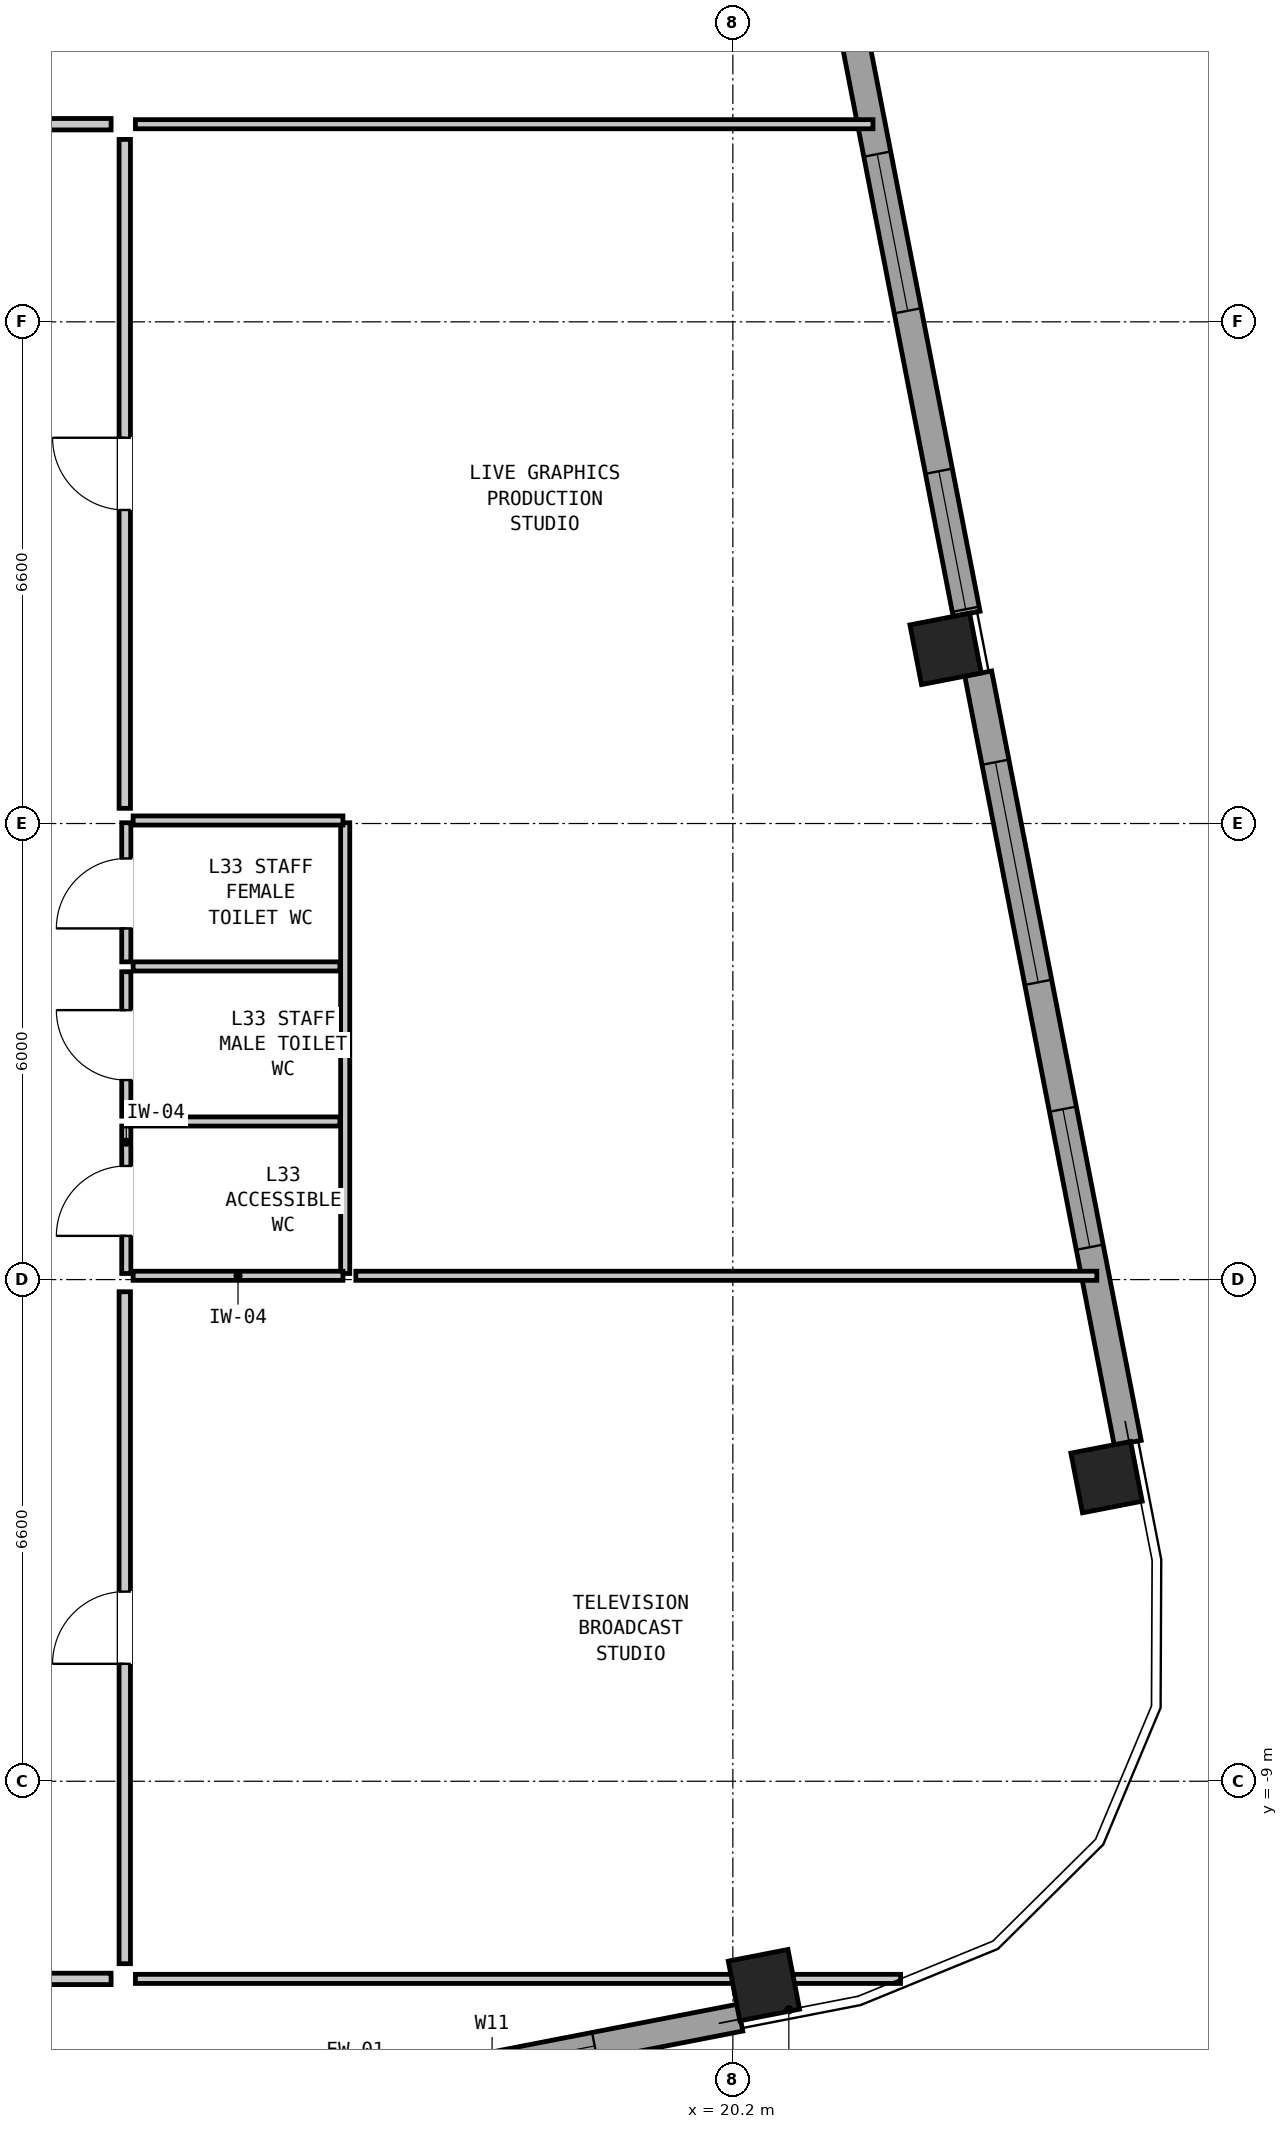
"""IFC4 building model, lengths in metres.
Left out: names, types, materials, properties, quantities, classifications, styles, units other than length and angle.
Written with IfcOpenShell. Run it as: python <this file> out.ifc"""

import sys

from ifc_helpers import new_model, si_unit, direction, frame, frame_2d, origin, origin_2d, place, context, subcontext, project, spatial, rectangle, hollow_rectangle, extrude, element, fill, save


model = new_model("IFC4")
c1 = context("Model", 3, precision=1e-05, world=origin(), true_north=direction((0.0, 1.0)))
c2 = subcontext(c1, "Body", "Model", "MODEL_VIEW")
j1 = project(units=[si_unit("LENGTHUNIT", "METRE"), si_unit("PLANEANGLEUNIT", "RADIAN")], contexts=[c1])
p1 = place(None, origin())
s1 = spatial("IfcSite", under=j1, at=p1, CompositionType="ELEMENT")
p2 = place(p1, origin())
s2 = spatial("IfcBuilding", under=s1, at=p2, CompositionType="ELEMENT")
p3 = place(p2, frame((0.0, 0.0, 115.85)))
s3 = spatial("IfcBuildingStorey", under=s2, at=p3, CompositionType="ELEMENT", Elevation=115.85)
for number, where, z_axis, x_axis in (
    (1, (20.609, -11.682, 0.0), (0.0, 0.0, 1.0), (0.982, 0.191, 0.0)),
    (2, (25.116, -5.0, 0.0), (0.0, 0.0, 1.0), (-0.191, 0.982, 0.0)),
    (3, (22.998, 5.896, 0.0), (0.0, 0.0, 1.0), (-0.191, 0.982, 0.0)),
):
    element("IfcColumn", number, at=place(p3, frame(where, z_axis=z_axis, x_axis=x_axis)), inside=s3, PredefinedType="COLUMN", context=c2, shape_type="SweptSolid", body=[
        extrude(hollow_rectangle(XDim=0.8, YDim=0.8, WallThickness=0.05, at=origin_2d()), origin(), (0.0, 0.0, 1.0), 3.05),
    ])
p4 = place(p3, frame((20.296, -12.11, 0.0), z_axis=(0.0, 0.0, 1.0), x_axis=(-0.981628941133, -0.190799952646, 0.0)))
e4 = element("IfcWall", 4, at=p4, inside=s3, PredefinedType="SOLIDWALL", context=c2, shape_type="SweptSolid", body=[
    extrude(rectangle(XDim=10.312, YDim=0.36, at=frame_2d((5.156, 0.0))), origin(), (0.0, 0.0, 1.0), 2.067),
])
p5 = place(p4, frame((1.95, 0.0, 0.2)))
e5 = element("IfcOpeningElement", 5, at=p5, cuts=e4, PredefinedType="OPENING", context=c2, shape_type="SweptSolid", body=[
    extrude(rectangle(XDim=2.75, YDim=0.95, at=frame_2d((1.375, 0.475))), frame((0.0, 0.192, 0.0), z_axis=(0.0, -1.0, 0.0), x_axis=(1.0, 0.0, 0.0)), (0.0, 0.0, 1.0), 0.384),
])
p6 = place(p4, frame((6.25, 0.0, 0.95)))
e6 = element("IfcOpeningElement", 6, at=p6, cuts=e4, PredefinedType="OPENING", context=c2, shape_type="SweptSolid", body=[
    extrude(rectangle(XDim=2.75, YDim=0.95, at=frame_2d((1.375, 0.475))), frame((0.0, 0.192, 0.0), z_axis=(0.0, -1.0, 0.0), x_axis=(1.0, 0.0, 0.0)), (0.0, 0.0, 1.0), 0.384),
])
p7 = place(p3, frame((21.31, 16.469, 0.0), z_axis=(0.0, 0.0, 1.0), x_axis=(0.190811924826, -0.981626614016, 0.0)))
e7 = element("IfcWall", 7, at=p7, inside=s3, PredefinedType="SOLIDWALL", context=c2, shape_type="SweptSolid", body=[
    extrude(rectangle(XDim=10.3, YDim=0.36, at=frame_2d((5.15, 0.0))), origin(), (0.0, 0.0, 1.0), 2.067),
])
p8 = place(p7, frame((0.038, 0.0, 0.2)))
e8 = element("IfcOpeningElement", 8, at=p8, cuts=e7, PredefinedType="OPENING", context=c2, shape_type="SweptSolid", body=[
    extrude(rectangle(XDim=1.8, YDim=1.25, at=frame_2d((0.9, 0.625))), frame((0.0, 0.192, 0.0), z_axis=(0.0, -1.0, 0.0), x_axis=(1.0, 0.0, 0.0)), (0.0, 0.0, 1.0), 0.384),
])
p9 = place(p7, frame((4.138, 0.0, 0.7)))
e9 = element("IfcOpeningElement", 9, at=p9, cuts=e7, PredefinedType="OPENING", context=c2, shape_type="SweptSolid", body=[
    extrude(rectangle(XDim=2.1, YDim=1.2, at=frame_2d((1.05, 0.6))), frame((0.0, 0.192, 0.0), z_axis=(0.0, -1.0, 0.0), x_axis=(1.0, 0.0, 0.0)), (0.0, 0.0, 1.0), 0.384),
])
p10 = place(p7, frame((8.388, 0.0, 0.2)))
e10 = element("IfcOpeningElement", 10, at=p10, cuts=e7, PredefinedType="OPENING", context=c2, shape_type="SweptSolid", body=[
    extrude(rectangle(XDim=1.85, YDim=1.2, at=frame_2d((0.925, 0.6))), frame((0.0, 0.192, 0.0), z_axis=(0.0, -1.0, 0.0), x_axis=(1.0, 0.0, 0.0)), (0.0, 0.0, 1.0), 0.384),
])
p11 = place(p3, frame((23.428, 5.573, 0.0), z_axis=(0.0, 0.0, 1.0), x_axis=(0.190827200853, -0.981623644486, 0.0)))
e11 = element("IfcWall", 11, at=p11, inside=s3, PredefinedType="SOLIDWALL", context=c2, shape_type="SweptSolid", body=[
    extrude(rectangle(XDim=10.312, YDim=0.36, at=frame_2d((5.156, 0.0))), origin(), (0.0, 0.0, 1.0), 2.067),
])
p12 = place(p11, frame((1.188, 0.0, 0.95)))
e12 = element("IfcOpeningElement", 12, at=p12, cuts=e11, PredefinedType="OPENING", context=c2, shape_type="SweptSolid", body=[
    extrude(rectangle(XDim=2.95, YDim=0.95, at=frame_2d((1.475, 0.475))), frame((0.0, 0.192, 0.0), z_axis=(0.0, -1.0, 0.0), x_axis=(1.0, 0.0, 0.0)), (0.0, 0.0, 1.0), 0.384),
])
p13 = place(p11, frame((5.838, 0.0, 0.2)))
e13 = element("IfcOpeningElement", 13, at=p13, cuts=e11, PredefinedType="OPENING", context=c2, shape_type="SweptSolid", body=[
    extrude(rectangle(XDim=1.85, YDim=1.15, at=frame_2d((0.925, 0.575))), frame((0.0, 0.192, 0.0), z_axis=(0.0, -1.0, 0.0), x_axis=(1.0, 0.0, 0.0)), (0.0, 0.0, 1.0), 0.384),
])
p14 = place(p3, frame((12.22, -2.32, 0.0), z_axis=(0.0, 0.0, 1.0), x_axis=(0.0, 1.0, 0.0)))
e14 = element("IfcWall", 14, at=p14, inside=s3, PredefinedType="PARTITIONING", context=c2, shape_type="SweptSolid", body=[
    extrude(rectangle(XDim=1.94, YDim=0.12, at=frame_2d((0.97, 0.0))), origin(), (0.0, 0.0, 1.0), 2.83),
])
p15 = place(p14, frame((0.495, 0.0, 0.0)))
e15 = element("IfcOpeningElement", 15, at=p15, cuts=e14, PredefinedType="OPENING", context=c2, shape_type="SweptSolid", body=[
    extrude(rectangle(XDim=0.92, YDim=2.1, at=frame_2d((0.46, 1.05))), frame((0.0, 0.072, 0.0), z_axis=(0.0, -1.0, 0.0), x_axis=(1.0, 0.0, 0.0)), (0.0, 0.0, 1.0), 0.144),
])
p16 = place(p3, frame((12.22, -0.25, 0.0), z_axis=(0.0, 0.0, 1.0), x_axis=(0.0, 1.0, 0.0)))
e16 = element("IfcWall", 16, at=p16, inside=s3, PredefinedType="PARTITIONING", context=c2, shape_type="SweptSolid", body=[
    extrude(rectangle(XDim=1.9, YDim=0.12, at=frame_2d((0.95, 0.0))), origin(), (0.0, 0.0, 1.0), 2.83),
])
p17 = place(p16, frame((0.475, 0.0, 0.0)))
e17 = element("IfcOpeningElement", 17, at=p17, cuts=e16, PredefinedType="OPENING", context=c2, shape_type="SweptSolid", body=[
    extrude(rectangle(XDim=0.92, YDim=2.1, at=frame_2d((0.46, 1.05))), frame((0.0, 0.072, 0.0), z_axis=(0.0, -1.0, 0.0), x_axis=(1.0, 0.0, 0.0)), (0.0, 0.0, 1.0), 0.144),
])
p18 = place(p3, frame((12.22, 1.78, 0.0), z_axis=(0.0, 0.0, 1.0), x_axis=(0.0, 1.0, 0.0)))
e18 = element("IfcWall", 18, at=p18, inside=s3, PredefinedType="PARTITIONING", context=c2, shape_type="SweptSolid", body=[
    extrude(rectangle(XDim=1.83, YDim=0.12, at=frame_2d((0.915, 0.0))), origin(), (0.0, 0.0, 1.0), 2.83),
])
p19 = place(p18, frame((0.44, 0.0, 0.0)))
e19 = element("IfcOpeningElement", 19, at=p19, cuts=e18, PredefinedType="OPENING", context=c2, shape_type="SweptSolid", body=[
    extrude(rectangle(XDim=0.92, YDim=2.1, at=frame_2d((0.46, 1.05))), frame((0.0, 0.072, 0.0), z_axis=(0.0, -1.0, 0.0), x_axis=(1.0, 0.0, 0.0)), (0.0, 0.0, 1.0), 0.144),
])
p20 = place(p3, frame((15.1, -2.32, 0.0), z_axis=(0.0, 0.0, 1.0), x_axis=(0.0, 1.0, 0.0)))
e20 = element("IfcWall", 20, at=p20, inside=s3, PredefinedType="PARTITIONING", context=c2, shape_type="SweptSolid", body=[
    extrude(rectangle(XDim=5.93, YDim=0.12, at=frame_2d((2.965, 0.0))), origin(), (0.0, 0.0, 1.0), 2.83),
])
for number, where, z_axis, x_axis in (
    (21, (12.31, -2.35, 0.0), (0.0, 0.0, 1.0), (1.0, 0.0, 0.0)),
    (22, (12.31, 3.64, 0.0), (0.0, 0.0, 1.0), (1.0, 0.0, 0.0)),
):
    element("IfcWall", number, at=place(p3, frame(where, z_axis=z_axis, x_axis=x_axis)), inside=s3, PredefinedType="PARTITIONING", context=c2, shape_type="SweptSolid", body=[
        extrude(rectangle(XDim=2.76, YDim=0.12, at=frame_2d((1.38, 0.0))), origin(), (0.0, 0.0, 1.0), 1.883),
    ])
for number, where, z_axis, x_axis in (
    (23, (12.31, -0.32, 0.0), (0.0, 0.0, 1.0), (1.0, 0.0, 0.0)),
    (24, (12.31, 1.72, 0.0), (0.0, 0.0, 1.0), (1.0, 0.0, 0.0)),
):
    element("IfcWall", number, at=place(p3, frame(where, z_axis=z_axis, x_axis=x_axis)), inside=s3, PredefinedType="PARTITIONING", context=c2, shape_type="SweptSolid", body=[
        extrude(rectangle(XDim=2.72, YDim=0.12, at=frame_2d((1.36, 0.0))), origin(), (0.0, 0.0, 1.0), 2.83),
    ])
p21 = place(p3, frame((12.34, 12.8, 0.0), z_axis=(0.0, 0.0, 1.0), x_axis=(1.0, 0.0, 0.0)))
e25 = element("IfcWall", 25, at=p21, inside=s3, PredefinedType="PARTITIONING", context=c2, shape_type="SweptSolid", body=[
    extrude(rectangle(XDim=9.703, YDim=0.12, at=frame_2d((4.852, 0.0))), origin(), (0.0, 0.0, 1.0), 2.83),
])
p22 = place(p3, frame((12.34, -11.6, 0.0), z_axis=(0.0, 0.0, 1.0), x_axis=(1.0, 0.0, 0.0)))
e26 = element("IfcWall", 26, at=p22, inside=s3, PredefinedType="PARTITIONING", context=c2, shape_type="SweptSolid", body=[
    extrude(rectangle(XDim=10.066, YDim=0.12, at=frame_2d((5.033, 0.0))), origin(), (0.0, 0.0, 1.0), 2.127),
])
p23 = place(p3, frame((15.24, -2.35, 0.0), z_axis=(0.0, 0.0, 1.0), x_axis=(1.0, 0.0, 0.0)))
e27 = element("IfcWall", 27, at=p23, inside=s3, PredefinedType="PARTITIONING", context=c2, shape_type="SweptSolid", body=[
    extrude(rectangle(XDim=9.748, YDim=0.12, at=frame_2d((4.874, 0.0))), origin(), (0.0, 0.0, 1.0), 1.883),
])
p24 = place(p3, frame((-2.12, 12.8, 0.0), z_axis=(0.0, 0.0, 1.0), x_axis=(1.0, 0.0, 0.0)))
e28 = element("IfcWall", 28, at=p24, inside=s3, PredefinedType="PARTITIONING", context=c2, shape_type="SweptSolid", body=[
    extrude(rectangle(XDim=14.14, YDim=0.15, at=frame_2d((7.07, 0.0))), origin(), (0.0, 0.0, 1.0), 2.83),
])
p25 = place(p24, frame((6.595, 0.0, 0.0)))
e29 = element("IfcOpeningElement", 29, at=p25, cuts=e28, PredefinedType="OPENING", context=c2, shape_type="SweptSolid", body=[
    extrude(rectangle(XDim=0.95, YDim=2.1, at=frame_2d((0.475, 1.05))), frame((0.0, 0.087, 0.0), z_axis=(0.0, -1.0, 0.0), x_axis=(1.0, 0.0, 0.0)), (0.0, 0.0, 1.0), 0.174),
])
p26 = place(p3, frame((-12.02, -11.6, 0.0), z_axis=(0.0, 0.0, 1.0), x_axis=(1.0, 0.0, 0.0)))
e30 = element("IfcWall", 30, at=p26, inside=s3, PredefinedType="PARTITIONING", context=c2, shape_type="SweptSolid", body=[
    extrude(rectangle(XDim=24.04, YDim=0.15, at=frame_2d((12.02, 0.0))), origin(), (0.0, 0.0, 1.0), 2.347),
])
p27 = place(p26, frame((11.545, 0.0, 0.0)))
e31 = element("IfcOpeningElement", 31, at=p27, cuts=e30, PredefinedType="OPENING", context=c2, shape_type="SweptSolid", body=[
    extrude(rectangle(XDim=0.95, YDim=2.1, at=frame_2d((0.475, 1.05))), frame((0.0, 0.087, 0.0), z_axis=(0.0, -1.0, 0.0), x_axis=(1.0, 0.0, 0.0)), (0.0, 0.0, 1.0), 0.174),
])
p28 = place(p3, frame((12.2, -11.4, 0.0), z_axis=(0.0, 0.0, 1.0), x_axis=(0.0, 1.0, 0.0)))
e32 = element("IfcWall", 32, at=p28, inside=s3, PredefinedType="PARTITIONING", context=c2, shape_type="SweptSolid", body=[
    extrude(rectangle(XDim=8.84, YDim=0.15, at=frame_2d((4.42, 0.0))), origin(), (0.0, 0.0, 1.0), 2.83),
])
p29 = place(p28, frame((3.945, 0.0, 0.0)))
e33 = element("IfcOpeningElement", 33, at=p29, cuts=e32, PredefinedType="OPENING", context=c2, shape_type="SweptSolid", body=[
    extrude(rectangle(XDim=0.95, YDim=2.1, at=frame_2d((0.475, 1.05))), frame((0.0, 0.087, 0.0), z_axis=(0.0, -1.0, 0.0), x_axis=(1.0, 0.0, 0.0)), (0.0, 0.0, 1.0), 0.174),
])
p30 = place(p3, frame((12.2, 3.8, 0.0), z_axis=(0.0, 0.0, 1.0), x_axis=(0.0, 1.0, 0.0)))
e34 = element("IfcWall", 34, at=p30, inside=s3, PredefinedType="PARTITIONING", context=c2, shape_type="SweptSolid", body=[
    extrude(rectangle(XDim=8.8, YDim=0.15, at=frame_2d((4.4, 0.0))), origin(), (0.0, 0.0, 1.0), 2.83),
])
p31 = place(p30, frame((3.925, 0.0, 0.0)))
e35 = element("IfcOpeningElement", 35, at=p31, cuts=e34, PredefinedType="OPENING", context=c2, shape_type="SweptSolid", body=[
    extrude(rectangle(XDim=0.95, YDim=2.1, at=frame_2d((0.475, 1.05))), frame((0.0, 0.087, 0.0), z_axis=(0.0, -1.0, 0.0), x_axis=(1.0, 0.0, 0.0)), (0.0, 0.0, 1.0), 0.174),
])
p32 = place(p5, origin())
e36 = element("IfcWindow", 36, at=p32, inside=s3, PartitioningType="SINGLE_PANEL", PredefinedType="WINDOW", context=c2, shape_type="SweptSolid", body=[
    extrude(rectangle(XDim=2.75, YDim=0.95, at=frame_2d((1.375, 0.475))), frame((0.0, 0.03, 0.0), z_axis=(0.0, -1.0, 0.0), x_axis=(1.0, 0.0, 0.0)), (0.0, 0.0, 1.0), 0.06),
])
fill(e5, e36)
p33 = place(p9, origin())
e37 = element("IfcWindow", 37, at=p33, inside=s3, PartitioningType="SINGLE_PANEL", PredefinedType="WINDOW", context=c2, shape_type="SweptSolid", body=[
    extrude(rectangle(XDim=2.1, YDim=1.2, at=frame_2d((1.05, 0.6))), frame((0.0, 0.03, 0.0), z_axis=(0.0, -1.0, 0.0), x_axis=(1.0, 0.0, 0.0)), (0.0, 0.0, 1.0), 0.06),
])
fill(e9, e37)
p34 = place(p10, origin())
e38 = element("IfcWindow", 38, at=p34, inside=s3, PartitioningType="SINGLE_PANEL", PredefinedType="WINDOW", context=c2, shape_type="SweptSolid", body=[
    extrude(rectangle(XDim=1.85, YDim=1.2, at=frame_2d((0.925, 0.6))), frame((0.0, 0.03, 0.0), z_axis=(0.0, -1.0, 0.0), x_axis=(1.0, 0.0, 0.0)), (0.0, 0.0, 1.0), 0.06),
])
fill(e10, e38)
p35 = place(p12, origin())
e39 = element("IfcWindow", 39, at=p35, inside=s3, PartitioningType="SINGLE_PANEL", PredefinedType="WINDOW", context=c2, shape_type="SweptSolid", body=[
    extrude(rectangle(XDim=2.95, YDim=0.95, at=frame_2d((1.475, 0.475))), frame((0.0, 0.03, 0.0), z_axis=(0.0, -1.0, 0.0), x_axis=(1.0, 0.0, 0.0)), (0.0, 0.0, 1.0), 0.06),
])
fill(e12, e39)
p36 = place(p13, origin())
e40 = element("IfcWindow", 40, at=p36, inside=s3, PartitioningType="SINGLE_PANEL", PredefinedType="WINDOW", context=c2, shape_type="SweptSolid", body=[
    extrude(rectangle(XDim=1.85, YDim=1.15, at=frame_2d((0.925, 0.575))), frame((0.0, 0.03, 0.0), z_axis=(0.0, -1.0, 0.0), x_axis=(1.0, 0.0, 0.0)), (0.0, 0.0, 1.0), 0.06),
])
fill(e13, e40)
p37 = place(p15, origin())
e41 = element("IfcDoor", 41, at=p37, inside=s3, OperationType="SINGLE_SWING_LEFT", PredefinedType="DOOR", context=c2, shape_type="SweptSolid", body=[
    extrude(rectangle(XDim=0.92, YDim=2.1, at=frame_2d((0.46, 1.05))), frame((0.0, 0.025, 0.0), z_axis=(0.0, -1.0, 0.0), x_axis=(1.0, 0.0, 0.0)), (0.0, 0.0, 1.0), 0.05),
])
fill(e15, e41)
p38 = place(p17, origin())
e42 = element("IfcDoor", 42, at=p38, inside=s3, OperationType="SINGLE_SWING_RIGHT", PredefinedType="DOOR", context=c2, shape_type="SweptSolid", body=[
    extrude(rectangle(XDim=0.92, YDim=2.1, at=frame_2d((0.46, 1.05))), frame((0.0, 0.025, 0.0), z_axis=(0.0, -1.0, 0.0), x_axis=(1.0, 0.0, 0.0)), (0.0, 0.0, 1.0), 0.05),
])
fill(e17, e42)
p39 = place(p19, origin())
e43 = element("IfcDoor", 43, at=p39, inside=s3, OperationType="SINGLE_SWING_LEFT", PredefinedType="DOOR", context=c2, shape_type="SweptSolid", body=[
    extrude(rectangle(XDim=0.92, YDim=2.1, at=frame_2d((0.46, 1.05))), frame((0.0, 0.025, 0.0), z_axis=(0.0, -1.0, 0.0), x_axis=(1.0, 0.0, 0.0)), (0.0, 0.0, 1.0), 0.05),
])
fill(e19, e43)
p40 = place(p29, origin())
e44 = element("IfcDoor", 44, at=p40, inside=s3, OperationType="SINGLE_SWING_LEFT", PredefinedType="DOOR", context=c2, shape_type="SweptSolid", body=[
    extrude(rectangle(XDim=0.95, YDim=2.1, at=frame_2d((0.475, 1.05))), frame((0.0, 0.025, 0.0), z_axis=(0.0, -1.0, 0.0), x_axis=(1.0, 0.0, 0.0)), (0.0, 0.0, 1.0), 0.05),
])
fill(e33, e44)
p41 = place(p31, origin())
e45 = element("IfcDoor", 45, at=p41, inside=s3, OperationType="SINGLE_SWING_RIGHT", PredefinedType="DOOR", context=c2, shape_type="SweptSolid", body=[
    extrude(rectangle(XDim=0.95, YDim=2.1, at=frame_2d((0.475, 1.05))), frame((0.0, 0.025, 0.0), z_axis=(0.0, -1.0, 0.0), x_axis=(1.0, 0.0, 0.0)), (0.0, 0.0, 1.0), 0.05),
])
fill(e35, e45)
save(model, sys.argv[1])
